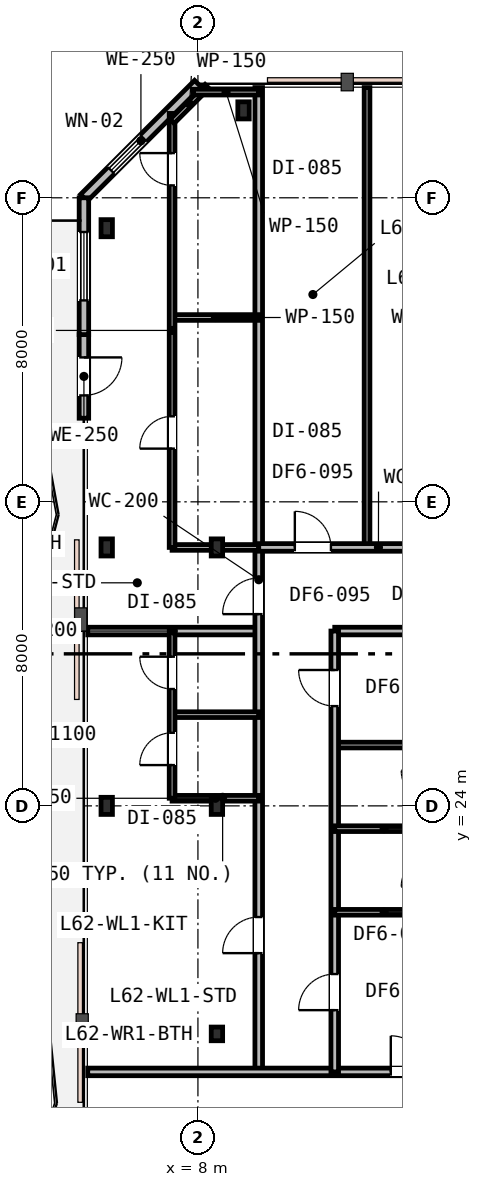
"""IFC4 building model, lengths in metres.
Left out: names, types, materials, properties, quantities, classifications, styles, units other than length and angle.
Written with IfcOpenShell. Run it as: python <this file> out.ifc"""

import sys

from ifc_helpers import new_model, si_unit, direction, frame, frame_2d, origin, origin_2d, place, context, subcontext, project, spatial, rectangle, i_section, extrude, element, fill, save


model = new_model("IFC4")
c1 = context("Model", 3, precision=1e-05, world=origin(), true_north=direction((0.0, 1.0)))
c2 = subcontext(c1, "Body", "Model", "MODEL_VIEW")
j1 = project(units=[si_unit("LENGTHUNIT", "METRE"), si_unit("PLANEANGLEUNIT", "RADIAN")], contexts=[c1])
p1 = place(None, origin())
s1 = spatial("IfcSite", under=j1, at=p1, CompositionType="ELEMENT")
p2 = place(p1, origin())
s2 = spatial("IfcBuilding", under=s1, at=p2, CompositionType="ELEMENT")
p3 = place(p2, frame((0.0, 0.0, 241.2)))
s3 = spatial("IfcBuildingStorey", under=s2, at=p3, CompositionType="ELEMENT", Elevation=241.2)
for number, where, z_axis, x_axis in (
    (1, (8.5, 24.0, 0.0), (0.0, 0.0, 1.0), (1.0, 0.0, 0.0)),
    (2, (5.6, 24.0, 0.0), (0.0, 0.0, 1.0), (1.0, 0.0, 0.0)),
    (3, (5.6, 30.8, 0.0), (0.0, 0.0, 1.0), (1.0, 0.0, 0.0)),
    (4, (5.6, 39.2, 0.0), (0.0, 0.0, 1.0), (1.0, 0.0, 0.0)),
    (5, (8.5, 30.8, 0.0), (0.0, 0.0, 1.0), (1.0, 0.0, 0.0)),
    (6, (9.2, 42.3, 0.0), (0.0, 0.0, 1.0), (1.0, 0.0, 0.0)),
):
    element("IfcColumn", number, at=place(p3, frame(where, z_axis=z_axis, x_axis=x_axis)), inside=s3, PredefinedType="COLUMN", context=c2, shape_type="SweptSolid", body=[
        extrude(i_section(OverallWidth=0.3, OverallDepth=0.45, WebThickness=0.014, FlangeThickness=0.026, FilletRadius=0.027, at=origin_2d()), origin(), (0.0, 0.0, 1.0), 3.8),
    ])
p4 = place(p3, frame((8.5, 18.0, 0.0), z_axis=(0.0, 0.0, 1.0), x_axis=(1.0, 0.0, 0.0)))
e7 = element("IfcColumn", 7, at=p4, inside=s3, PredefinedType="COLUMN", context=c2, shape_type="SweptSolid", body=[
    extrude(i_section(OverallWidth=0.3, OverallDepth=0.36, WebThickness=0.013, FlangeThickness=0.022, FilletRadius=0.027, at=origin_2d()), origin(), (0.0, 0.0, 1.0), 3.8),
])
p5 = place(p3, frame((8.0, 43.0, 0.0), z_axis=(0.0, 0.0, 1.0), x_axis=(-0.707106781187, -0.707106781187, 0.0)))
e8 = element("IfcWall", 8, at=p5, inside=s3, PredefinedType="STANDARD", context=c2, shape_type="SweptSolid", body=[
    extrude(rectangle(XDim=4.243, YDim=0.25, at=frame_2d((2.121, 0.0))), origin(), (0.0, 0.0, 1.0), 3.53),
])
p6 = place(p5, frame((2.027, 0.0, 0.85)))
e9 = element("IfcOpeningElement", 9, at=p6, cuts=e8, PredefinedType="OPENING", context=c2, shape_type="SweptSolid", body=[
    extrude(rectangle(XDim=1.2, YDim=1.6, at=frame_2d((0.6, 0.8))), frame((0.0, 0.135, 0.0), z_axis=(0.0, -1.0, 0.0), x_axis=(1.0, 0.0, 0.0)), (0.0, 0.0, 1.0), 0.27),
])
p7 = place(p3, frame((5.0, 36.4, 0.0), z_axis=(0.0, 0.0, 1.0), x_axis=(0.0, -1.0, 0.0)))
e10 = element("IfcWall", 10, at=p7, inside=s3, PredefinedType="STANDARD", context=c2, shape_type="SweptSolid", body=[
    extrude(rectangle(XDim=2.2, YDim=0.25, at=frame_2d((1.1, 0.0))), origin(), (0.0, 0.0, 1.0), 3.53),
])
p8 = place(p7, frame((0.6, 0.0, 0.0)))
e11 = element("IfcOpeningElement", 11, at=p8, cuts=e10, PredefinedType="OPENING", context=c2, shape_type="SweptSolid", body=[
    extrude(rectangle(XDim=1.0, YDim=2.15, at=frame_2d((0.5, 1.075))), frame((0.0, 0.135, 0.0), z_axis=(0.0, -1.0, 0.0), x_axis=(1.0, 0.0, 0.0)), (0.0, 0.0, 1.0), 0.27),
])
p9 = place(p3, frame((5.0, 40.0, 0.0), z_axis=(0.0, 0.0, 1.0), x_axis=(0.0, -1.0, 0.0)))
e12 = element("IfcWall", 12, at=p9, inside=s3, PredefinedType="STANDARD", context=c2, shape_type="SweptSolid", body=[
    extrude(rectangle(XDim=3.6, YDim=0.25, at=frame_2d((1.8, 0.0))), origin(), (0.0, 0.0, 1.0), 3.53),
])
p10 = place(p9, frame((0.9, 0.0, 0.75)))
e13 = element("IfcOpeningElement", 13, at=p10, cuts=e12, PredefinedType="OPENING", context=c2, shape_type="SweptSolid", body=[
    extrude(rectangle(XDim=1.8, YDim=1.85, at=frame_2d((0.9, 0.925))), frame((0.0, 0.135, 0.0), z_axis=(0.0, -1.0, 0.0), x_axis=(1.0, 0.0, 0.0)), (0.0, 0.0, 1.0), 0.27),
])
p11 = place(p3, frame((5.1, 28.6, 0.0), z_axis=(0.0, 0.0, 1.0), x_axis=(1.0, 0.0, 0.0)))
e14 = element("IfcWall", 14, at=p11, inside=s3, PredefinedType="PARTITIONING", context=c2, shape_type="SweptSolid", body=[
    extrude(rectangle(XDim=4.5, YDim=0.2, at=frame_2d((2.25, 0.0))), origin(), (0.0, 0.0, 1.0), 3.16),
])
p12 = place(p3, frame((11.6, 28.6, 0.0), z_axis=(0.0, 0.0, 1.0), x_axis=(1.0, 0.0, 0.0)))
e15 = element("IfcWall", 15, at=p12, inside=s3, PredefinedType="PARTITIONING", context=c2, shape_type="SweptSolid", body=[
    extrude(rectangle(XDim=34.3, YDim=0.2, at=frame_2d((17.15, 0.0))), origin(), (0.0, 0.0, 1.0), 3.16),
])
p13 = place(p12, frame((14.625, 0.0, 0.0)))
e16 = element("IfcOpeningElement", 16, at=p13, cuts=e15, PredefinedType="OPENING", context=c2, shape_type="SweptSolid", body=[
    extrude(rectangle(XDim=0.95, YDim=2.15, at=frame_2d((0.475, 1.075))), frame((0.0, 0.11, 0.0), z_axis=(0.0, -1.0, 0.0), x_axis=(1.0, 0.0, 0.0)), (0.0, 0.0, 1.0), 0.22),
])
p14 = place(p12, frame((26.225, 0.0, 0.0)))
e17 = element("IfcOpeningElement", 17, at=p14, cuts=e15, PredefinedType="OPENING", context=c2, shape_type="SweptSolid", body=[
    extrude(rectangle(XDim=0.95, YDim=2.15, at=frame_2d((0.475, 1.075))), frame((0.0, 0.11, 0.0), z_axis=(0.0, -1.0, 0.0), x_axis=(1.0, 0.0, 0.0)), (0.0, 0.0, 1.0), 0.22),
])
p15 = place(p3, frame((9.6, 17.0, 0.0), z_axis=(0.0, 0.0, 1.0), x_axis=(0.0, 1.0, 0.0)))
e18 = element("IfcWall", 18, at=p15, inside=s3, PredefinedType="PARTITIONING", context=c2, shape_type="SweptSolid", body=[
    extrude(rectangle(XDim=25.9, YDim=0.2, at=frame_2d((12.95, 0.0))), origin(), (0.0, 0.0, 1.0), 3.16),
])
p16 = place(p15, frame((12.045, 0.0, 0.0)))
e19 = element("IfcOpeningElement", 19, at=p16, cuts=e18, PredefinedType="OPENING", context=c2, shape_type="SweptSolid", body=[
    extrude(rectangle(XDim=0.95, YDim=2.15, at=frame_2d((0.475, 1.075))), frame((0.0, 0.11, 0.0), z_axis=(0.0, -1.0, 0.0), x_axis=(1.0, 0.0, 0.0)), (0.0, 0.0, 1.0), 0.22),
])
p17 = place(p15, frame((3.125, 0.0, 0.0)))
e20 = element("IfcOpeningElement", 20, at=p17, cuts=e18, PredefinedType="OPENING", context=c2, shape_type="SweptSolid", body=[
    extrude(rectangle(XDim=0.95, YDim=2.15, at=frame_2d((0.475, 1.075))), frame((0.0, 0.11, 0.0), z_axis=(0.0, -1.0, 0.0), x_axis=(1.0, 0.0, 0.0)), (0.0, 0.0, 1.0), 0.22),
])
p18 = place(p3, frame((7.32, 30.8, 0.0), z_axis=(0.0, 0.0, 1.0), x_axis=(1.0, 0.0, 0.0)))
e21 = element("IfcWall", 21, at=p18, inside=s3, PredefinedType="PARTITIONING", context=c2, shape_type="SweptSolid", body=[
    extrude(rectangle(XDim=2.28, YDim=0.15, at=frame_2d((1.14, 0.0))), origin(), (0.0, 0.0, 1.0), 3.16),
])
p19 = place(p3, frame((7.32, 36.85, 0.0), z_axis=(0.0, 0.0, 1.0), x_axis=(1.0, 0.0, 0.0)))
e22 = element("IfcWall", 22, at=p19, inside=s3, PredefinedType="PARTITIONING", context=c2, shape_type="SweptSolid", body=[
    extrude(rectangle(XDim=2.28, YDim=0.15, at=frame_2d((1.14, 0.0))), origin(), (0.0, 0.0, 1.0), 3.53),
])
p20 = place(p3, frame((7.32, 30.8, 0.0), z_axis=(0.0, 0.0, 1.0), x_axis=(0.0, 1.0, 0.0)))
e23 = element("IfcWall", 23, at=p20, inside=s3, PredefinedType="PARTITIONING", context=c2, shape_type="SweptSolid", body=[
    extrude(rectangle(XDim=11.42, YDim=0.15, at=frame_2d((5.71, 0.0))), origin(), (0.0, 0.0, 1.0), 3.16),
])
p21 = place(p20, frame((2.6, 0.0, 0.0)))
e24 = element("IfcOpeningElement", 24, at=p21, cuts=e23, PredefinedType="OPENING", context=c2, shape_type="SweptSolid", body=[
    extrude(rectangle(XDim=0.85, YDim=2.15, at=frame_2d((0.425, 1.075))), frame((0.0, 0.085, 0.0), z_axis=(0.0, -1.0, 0.0), x_axis=(1.0, 0.0, 0.0)), (0.0, 0.0, 1.0), 0.17),
])
p22 = place(p20, frame((9.526, 0.0, 0.0)))
e25 = element("IfcOpeningElement", 25, at=p22, cuts=e23, PredefinedType="OPENING", context=c2, shape_type="SweptSolid", body=[
    extrude(rectangle(XDim=0.85, YDim=2.15, at=frame_2d((0.425, 1.075))), frame((0.0, 0.085, 0.0), z_axis=(0.0, -1.0, 0.0), x_axis=(1.0, 0.0, 0.0)), (0.0, 0.0, 1.0), 0.17),
])
p23 = place(p3, frame((7.32, 42.009, 0.0), z_axis=(0.0, 0.0, 1.0), x_axis=(0.707106781187, 0.707106781187, 0.0)))
e26 = element("IfcWall", 26, at=p23, inside=s3, PredefinedType="PARTITIONING", context=c2, shape_type="SweptSolid", body=[
    extrude(rectangle(XDim=1.302, YDim=0.15, at=frame_2d((0.651, 0.0))), origin(), (0.0, 0.0, 1.0), 3.53),
])
p24 = place(p3, frame((7.88, 42.78, 0.0), z_axis=(0.0, 0.0, 1.0), x_axis=(1.0, 0.0, 0.0)))
e27 = element("IfcWall", 27, at=p24, inside=s3, PredefinedType="PARTITIONING", context=c2, shape_type="SweptSolid", body=[
    extrude(rectangle(XDim=1.72, YDim=0.15, at=frame_2d((0.86, 0.0))), origin(), (0.0, 0.0, 1.0), 3.27),
])
p25 = place(p3, frame((12.45, 30.8, 0.0), z_axis=(0.0, 0.0, 1.0), x_axis=(0.0, 1.0, 0.0)))
e28 = element("IfcWall", 28, at=p25, inside=s3, PredefinedType="PARTITIONING", context=c2, shape_type="SweptSolid", body=[
    extrude(rectangle(XDim=12.1, YDim=0.15, at=frame_2d((6.05, 0.0))), origin(), (0.0, 0.0, 1.0), 3.16),
])
p26 = place(p3, frame((9.6, 30.8, 0.0), z_axis=(0.0, 0.0, 1.0), x_axis=(1.0, 0.0, 0.0)))
e29 = element("IfcWall", 29, at=p26, inside=s3, PredefinedType="PARTITIONING", context=c2, shape_type="SweptSolid", body=[
    extrude(rectangle(XDim=6.3, YDim=0.2, at=frame_2d((3.15, 0.0))), origin(), (0.0, 0.0, 1.0), 3.16),
])
p27 = place(p26, frame((0.95, 0.0, 0.0)))
e30 = element("IfcOpeningElement", 30, at=p27, cuts=e29, PredefinedType="OPENING", context=c2, shape_type="SweptSolid", body=[
    extrude(rectangle(XDim=0.95, YDim=2.15, at=frame_2d((0.475, 1.075))), frame((0.0, 0.11, 0.0), z_axis=(0.0, -1.0, 0.0), x_axis=(1.0, 0.0, 0.0)), (0.0, 0.0, 1.0), 0.22),
])
p28 = place(p26, frame((4.1, 0.0, 0.0)))
e31 = element("IfcOpeningElement", 31, at=p28, cuts=e29, PredefinedType="OPENING", context=c2, shape_type="SweptSolid", body=[
    extrude(rectangle(XDim=0.95, YDim=2.15, at=frame_2d((0.475, 1.075))), frame((0.0, 0.11, 0.0), z_axis=(0.0, -1.0, 0.0), x_axis=(1.0, 0.0, 0.0)), (0.0, 0.0, 1.0), 0.22),
])
p29 = place(p3, frame((5.1, 17.0, 0.0), z_axis=(0.0, 0.0, 1.0), x_axis=(1.0, 0.0, 0.0)))
e32 = element("IfcWall", 32, at=p29, inside=s3, PredefinedType="PARTITIONING", context=c2, shape_type="SweptSolid", body=[
    extrude(rectangle(XDim=18.8, YDim=0.2, at=frame_2d((9.4, 0.0))), origin(), (0.0, 0.0, 1.0), 3.16),
])
p30 = place(p29, frame((7.975, 0.0, 0.0)))
e33 = element("IfcOpeningElement", 33, at=p30, cuts=e32, PredefinedType="OPENING", context=c2, shape_type="SweptSolid", body=[
    extrude(rectangle(XDim=0.95, YDim=2.15, at=frame_2d((0.475, 1.075))), frame((0.0, 0.11, 0.0), z_axis=(0.0, -1.0, 0.0), x_axis=(1.0, 0.0, 0.0)), (0.0, 0.0, 1.0), 0.22),
])
for number, where, z_axis, x_axis in (
    (34, (7.32, 24.2, 0.0), (0.0, 0.0, 1.0), (1.0, 0.0, 0.0)),
    (35, (7.32, 26.4, 0.0), (0.0, 0.0, 1.0), (1.0, 0.0, 0.0)),
):
    element("IfcWall", number, at=place(p3, frame(where, z_axis=z_axis, x_axis=x_axis)), inside=s3, PredefinedType="PARTITIONING", context=c2, shape_type="SweptSolid", body=[
        extrude(rectangle(XDim=2.28, YDim=0.15, at=frame_2d((1.14, 0.0))), origin(), (0.0, 0.0, 1.0), 3.16),
    ])
p31 = place(p3, frame((7.32, 24.2, 0.0), z_axis=(0.0, 0.0, 1.0), x_axis=(0.0, 1.0, 0.0)))
e36 = element("IfcWall", 36, at=p31, inside=s3, PredefinedType="PARTITIONING", context=c2, shape_type="SweptSolid", body=[
    extrude(rectangle(XDim=4.4, YDim=0.15, at=frame_2d((2.2, 0.0))), origin(), (0.0, 0.0, 1.0), 3.16),
])
p32 = place(p31, frame((0.873, 0.0, 0.0)))
e37 = element("IfcOpeningElement", 37, at=p32, cuts=e36, PredefinedType="OPENING", context=c2, shape_type="SweptSolid", body=[
    extrude(rectangle(XDim=0.85, YDim=2.15, at=frame_2d((0.425, 1.075))), frame((0.0, 0.085, 0.0), z_axis=(0.0, -1.0, 0.0), x_axis=(1.0, 0.0, 0.0)), (0.0, 0.0, 1.0), 0.17),
])
p33 = place(p31, frame((2.875, 0.0, 0.0)))
e38 = element("IfcOpeningElement", 38, at=p33, cuts=e36, PredefinedType="OPENING", context=c2, shape_type="SweptSolid", body=[
    extrude(rectangle(XDim=0.85, YDim=2.15, at=frame_2d((0.425, 1.075))), frame((0.0, 0.085, 0.0), z_axis=(0.0, -1.0, 0.0), x_axis=(1.0, 0.0, 0.0)), (0.0, 0.0, 1.0), 0.17),
])
p34 = place(p3, frame((11.6, 25.6, 0.0), z_axis=(0.0, 0.0, 1.0), x_axis=(1.0, 0.0, 0.0)))
e39 = element("IfcWall", 39, at=p34, inside=s3, PredefinedType="PARTITIONING", context=c2, shape_type="SweptSolid", body=[
    extrude(rectangle(XDim=12.3, YDim=0.15, at=frame_2d((6.15, 0.0))), origin(), (0.0, 0.0, 1.0), 3.16),
])
p35 = place(p3, frame((11.6, 17.0, 0.0), z_axis=(0.0, 0.0, 1.0), x_axis=(0.0, 1.0, 0.0)))
e40 = element("IfcWall", 40, at=p35, inside=s3, PredefinedType="PARTITIONING", context=c2, shape_type="SweptSolid", body=[
    extrude(rectangle(XDim=11.6, YDim=0.2, at=frame_2d((5.8, 0.0))), origin(), (0.0, 0.0, 1.0), 3.16),
])
p36 = place(p35, frame((9.625, 0.0, 0.0)))
e41 = element("IfcOpeningElement", 41, at=p36, cuts=e40, PredefinedType="OPENING", context=c2, shape_type="SweptSolid", body=[
    extrude(rectangle(XDim=0.95, YDim=2.15, at=frame_2d((0.475, 1.075))), frame((0.0, 0.11, 0.0), z_axis=(0.0, -1.0, 0.0), x_axis=(1.0, 0.0, 0.0)), (0.0, 0.0, 1.0), 0.22),
])
p37 = place(p35, frame((1.625, 0.0, 0.0)))
e42 = element("IfcOpeningElement", 42, at=p37, cuts=e40, PredefinedType="OPENING", context=c2, shape_type="SweptSolid", body=[
    extrude(rectangle(XDim=0.95, YDim=2.15, at=frame_2d((0.475, 1.075))), frame((0.0, 0.11, 0.0), z_axis=(0.0, -1.0, 0.0), x_axis=(1.0, 0.0, 0.0)), (0.0, 0.0, 1.0), 0.22),
])
for number, where, z_axis, x_axis in (
    (43, (11.6, 21.2, 0.0), (0.0, 0.0, 1.0), (1.0, 0.0, 0.0)),
    (44, (11.6, 23.4, 0.0), (0.0, 0.0, 1.0), (1.0, 0.0, 0.0)),
):
    element("IfcWall", number, at=place(p3, frame(where, z_axis=z_axis, x_axis=x_axis)), inside=s3, PredefinedType="PARTITIONING", context=c2, shape_type="SweptSolid", body=[
        extrude(rectangle(XDim=2.6, YDim=0.15, at=frame_2d((1.3, 0.0))), origin(), (0.0, 0.0, 1.0), 3.53),
    ])
p38 = place(p6, origin())
e45 = element("IfcWindow", 45, at=p38, inside=s3, PartitioningType="SINGLE_PANEL", PredefinedType="WINDOW", context=c2, shape_type="SweptSolid", body=[
    extrude(rectangle(XDim=1.2, YDim=1.6, at=frame_2d((0.6, 0.8))), frame((0.0, 0.03, 0.0), z_axis=(0.0, -1.0, 0.0), x_axis=(1.0, 0.0, 0.0)), (0.0, 0.0, 1.0), 0.06),
])
fill(e9, e45)
p39 = place(p8, origin())
e46 = element("IfcDoor", 46, at=p39, inside=s3, OperationType="SINGLE_SWING_LEFT", PredefinedType="DOOR", context=c2, shape_type="SweptSolid", body=[
    extrude(rectangle(XDim=1.0, YDim=2.15, at=frame_2d((0.5, 1.075))), frame((0.0, 0.025, 0.0), z_axis=(0.0, -1.0, 0.0), x_axis=(1.0, 0.0, 0.0)), (0.0, 0.0, 1.0), 0.05),
])
fill(e11, e46)
p40 = place(p10, origin())
e47 = element("IfcWindow", 47, at=p40, inside=s3, PartitioningType="SINGLE_PANEL", PredefinedType="WINDOW", context=c2, shape_type="SweptSolid", body=[
    extrude(rectangle(XDim=1.8, YDim=1.85, at=frame_2d((0.9, 0.925))), frame((0.0, 0.03, 0.0), z_axis=(0.0, -1.0, 0.0), x_axis=(1.0, 0.0, 0.0)), (0.0, 0.0, 1.0), 0.06),
])
fill(e13, e47)
p41 = place(p16, origin())
e48 = element("IfcDoor", 48, at=p41, inside=s3, OperationType="SINGLE_SWING_LEFT", PredefinedType="DOOR", context=c2, shape_type="SweptSolid", body=[
    extrude(rectangle(XDim=0.95, YDim=2.15, at=frame_2d((0.475, 1.075))), frame((0.0, 0.025, 0.0), z_axis=(0.0, -1.0, 0.0), x_axis=(1.0, 0.0, 0.0)), (0.0, 0.0, 1.0), 0.05),
])
fill(e19, e48)
p42 = place(p21, origin())
e49 = element("IfcDoor", 49, at=p42, inside=s3, OperationType="SINGLE_SWING_LEFT", PredefinedType="DOOR", context=c2, shape_type="SweptSolid", body=[
    extrude(rectangle(XDim=0.85, YDim=2.15, at=frame_2d((0.425, 1.075))), frame((0.0, 0.025, 0.0), z_axis=(0.0, -1.0, 0.0), x_axis=(1.0, 0.0, 0.0)), (0.0, 0.0, 1.0), 0.05),
])
fill(e24, e49)
p43 = place(p22, origin())
e50 = element("IfcDoor", 50, at=p43, inside=s3, OperationType="SINGLE_SWING_RIGHT", PredefinedType="DOOR", context=c2, shape_type="SweptSolid", body=[
    extrude(rectangle(XDim=0.85, YDim=2.15, at=frame_2d((0.425, 1.075))), frame((0.0, 0.025, 0.0), z_axis=(0.0, -1.0, 0.0), x_axis=(1.0, 0.0, 0.0)), (0.0, 0.0, 1.0), 0.05),
])
fill(e25, e50)
p44 = place(p27, origin())
e51 = element("IfcDoor", 51, at=p44, inside=s3, OperationType="SINGLE_SWING_LEFT", PredefinedType="DOOR", context=c2, shape_type="SweptSolid", body=[
    extrude(rectangle(XDim=0.95, YDim=2.15, at=frame_2d((0.475, 1.075))), frame((0.0, 0.025, 0.0), z_axis=(0.0, -1.0, 0.0), x_axis=(1.0, 0.0, 0.0)), (0.0, 0.0, 1.0), 0.05),
])
fill(e30, e51)
p45 = place(p17, origin())
e52 = element("IfcDoor", 52, at=p45, inside=s3, OperationType="SINGLE_SWING_LEFT", PredefinedType="DOOR", context=c2, shape_type="SweptSolid", body=[
    extrude(rectangle(XDim=0.95, YDim=2.15, at=frame_2d((0.475, 1.075))), frame((0.0, 0.025, 0.0), z_axis=(0.0, -1.0, 0.0), x_axis=(1.0, 0.0, 0.0)), (0.0, 0.0, 1.0), 0.05),
])
fill(e20, e52)
p46 = place(p32, origin())
e53 = element("IfcDoor", 53, at=p46, inside=s3, OperationType="SINGLE_SWING_LEFT", PredefinedType="DOOR", context=c2, shape_type="SweptSolid", body=[
    extrude(rectangle(XDim=0.85, YDim=2.15, at=frame_2d((0.425, 1.075))), frame((0.0, 0.025, 0.0), z_axis=(0.0, -1.0, 0.0), x_axis=(1.0, 0.0, 0.0)), (0.0, 0.0, 1.0), 0.05),
])
fill(e37, e53)
p47 = place(p33, origin())
e54 = element("IfcDoor", 54, at=p47, inside=s3, OperationType="SINGLE_SWING_RIGHT", PredefinedType="DOOR", context=c2, shape_type="SweptSolid", body=[
    extrude(rectangle(XDim=0.85, YDim=2.15, at=frame_2d((0.425, 1.075))), frame((0.0, 0.025, 0.0), z_axis=(0.0, -1.0, 0.0), x_axis=(1.0, 0.0, 0.0)), (0.0, 0.0, 1.0), 0.05),
])
fill(e38, e54)
p48 = place(p36, origin())
e55 = element("IfcDoor", 55, at=p48, inside=s3, OperationType="SINGLE_SWING_RIGHT", PredefinedType="DOOR", context=c2, shape_type="SweptSolid", body=[
    extrude(rectangle(XDim=0.95, YDim=2.15, at=frame_2d((0.475, 1.075))), frame((0.0, 0.025, 0.0), z_axis=(0.0, -1.0, 0.0), x_axis=(1.0, 0.0, 0.0)), (0.0, 0.0, 1.0), 0.05),
])
fill(e41, e55)
p49 = place(p37, origin())
e56 = element("IfcDoor", 56, at=p49, inside=s3, OperationType="SINGLE_SWING_LEFT", PredefinedType="DOOR", context=c2, shape_type="SweptSolid", body=[
    extrude(rectangle(XDim=0.95, YDim=2.15, at=frame_2d((0.475, 1.075))), frame((0.0, 0.025, 0.0), z_axis=(0.0, -1.0, 0.0), x_axis=(1.0, 0.0, 0.0)), (0.0, 0.0, 1.0), 0.05),
])
fill(e42, e56)
p50 = place(p30, origin())
e57 = element("IfcDoor", 57, at=p50, inside=s3, OperationType="SINGLE_SWING_LEFT", PredefinedType="DOOR", context=c2, shape_type="SweptSolid", body=[
    extrude(rectangle(XDim=0.95, YDim=2.15, at=frame_2d((0.475, 1.075))), frame((0.0, 0.025, 0.0), z_axis=(0.0, -1.0, 0.0), x_axis=(1.0, 0.0, 0.0)), (0.0, 0.0, 1.0), 0.05),
])
fill(e33, e57)
save(model, sys.argv[1])
